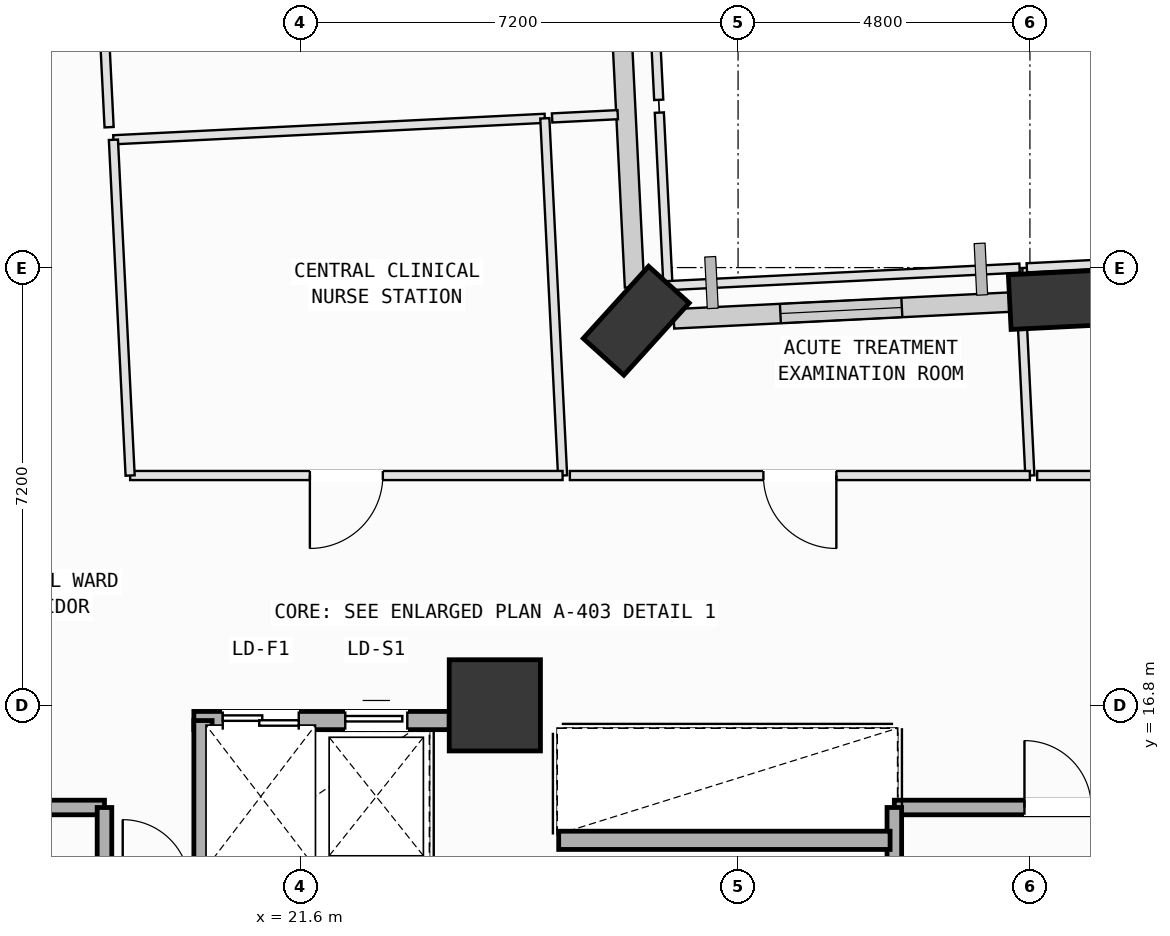
"""IFC4 building model, lengths in metres.
Left out: names, types, materials, properties, quantities, classifications, styles, units other than length and angle.
Written with IfcOpenShell. Run it as: python <this file> out.ifc"""

import sys

from ifc_helpers import new_model, si_unit, direction, frame, frame_2d, origin, origin_2d, place, context, subcontext, project, spatial, rectangle, extrude, element, fill, save


model = new_model("IFC4")
c1 = context("Model", 3, precision=1e-05, world=origin(), true_north=direction((0.0, 1.0)))
c2 = subcontext(c1, "Body", "Model", "MODEL_VIEW")
j1 = project(units=[si_unit("LENGTHUNIT", "METRE"), si_unit("PLANEANGLEUNIT", "RADIAN")], contexts=[c1])
p1 = place(None, origin())
s1 = spatial("IfcSite", under=j1, at=p1, CompositionType="ELEMENT")
p2 = place(p1, origin())
s2 = spatial("IfcBuilding", under=s1, at=p2, CompositionType="ELEMENT")
p3 = place(p2, frame((0.0, 0.0, 35.0)))
s3 = spatial("IfcBuildingStorey", under=s2, at=p3, CompositionType="ELEMENT", Elevation=35.0)
p4 = place(p3, frame((24.8, 16.8, 0.0), z_axis=(0.0, 0.0, 1.0), x_axis=(1.0, 0.0, 0.0)))
e1 = element("IfcColumn", 1, at=p4, inside=s3, PredefinedType="COLUMN", context=c2, shape_type="SweptSolid", body=[
    extrude(rectangle(XDim=1.5, YDim=1.5, at=origin_2d()), origin(), (0.0, 0.0, 1.0), 4.0),
])
p5 = place(p3, frame((34.067, 23.472, 0.002), z_axis=(0.00549776835, 0.00195476208, 0.999982976579), x_axis=(-0.381442714794, 0.924392433526, 0.000290121348)))
e2 = element("IfcColumn", 2, at=p5, inside=s3, PredefinedType="COLUMN", context=c2, shape_type="SweptSolid", body=[
    extrude(rectangle(XDim=1.6, YDim=0.9, at=origin_2d()), origin(), (0.0, 0.0, 1.0), 3.997),
])
p6 = place(p3, frame((27.125, 23.126, 0.002), z_axis=(0.007144481212, -0.02674600659, 0.999616730312), x_axis=(0.457080602538, 0.889188431992, 0.020524502304)))
e3 = element("IfcColumn", 3, at=p6, inside=s3, PredefinedType="COLUMN", context=c2, shape_type="SweptSolid", body=[
    extrude(rectangle(XDim=1.6, YDim=0.9, at=origin_2d()), origin(), (0.0, 0.0, 1.0), 3.998),
])
p7 = place(p3, frame((27.742, 23.157, 0.0), z_axis=(0.0, 0.0, 1.0), x_axis=(0.998763564374, 0.049712598789, 0.0)))
e4 = element("IfcWall", 4, at=p7, inside=s3, PredefinedType="SOLIDWALL", context=c2, shape_type="SweptSolid", body=[
    extrude(rectangle(XDim=5.736, YDim=0.32, at=frame_2d((2.868, 0.0))), origin(), (0.0, 0.0, 1.0), 3.165),
])
p8 = place(p7, frame((1.757, 0.0, 0.75)))
e5 = element("IfcOpeningElement", 5, at=p8, cuts=e4, PredefinedType="OPENING", context=c2, shape_type="SweptSolid", body=[
    extrude(rectangle(XDim=2.0, YDim=1.95, at=frame_2d((1.0, 0.975))), frame((0.0, 0.17, 0.0), z_axis=(0.0, -1.0, 0.0), x_axis=(1.0, 0.0, 0.0)), (0.0, 0.0, 1.0), 0.34),
])
p9 = place(p3, frame((27.098, 23.679, 0.0), z_axis=(0.0, 0.0, 1.0), x_axis=(-0.049717778481, 0.998763306546, 0.0)))
e6 = element("IfcWall", 6, at=p9, inside=s3, PredefinedType="SOLIDWALL", context=c2, shape_type="SweptSolid", body=[
    extrude(rectangle(XDim=6.536, YDim=0.32, at=frame_2d((3.268, 0.0))), origin(), (0.0, 0.0, 1.0), 3.165),
])
p10 = place(p3, frame((14.92, 15.12, 0.0), z_axis=(0.0, 0.0, 1.0), x_axis=(1.0, 0.0, 0.0)))
e7 = element("IfcWall", 7, at=p10, inside=s3, PredefinedType="SOLIDWALL", context=c2, shape_type="SweptSolid", body=[
    extrude(rectangle(XDim=3.46, YDim=0.24, at=frame_2d((1.73, 0.0))), origin(), (0.0, 0.0, 1.0), 3.78),
])
p11 = place(p10, frame((0.22, 0.0, 0.0)))
e8 = element("IfcOpeningElement", 8, at=p11, cuts=e7, PredefinedType="OPENING", context=c2, shape_type="SweptSolid", body=[
    extrude(rectangle(XDim=1.1, YDim=2.15, at=frame_2d((0.55, 1.075))), frame((0.0, 0.13, 0.0), z_axis=(0.0, -1.0, 0.0), x_axis=(1.0, 0.0, 0.0)), (0.0, 0.0, 1.0), 0.26),
])
p12 = place(p3, frame((18.38, 15.12, 0.0), z_axis=(0.0, 0.0, 1.0), x_axis=(0.0, -1.0, 0.0)))
e9 = element("IfcWall", 9, at=p12, inside=s3, PredefinedType="SOLIDWALL", context=c2, shape_type="SweptSolid", body=[
    extrude(rectangle(XDim=6.92, YDim=0.24, at=frame_2d((3.46, 0.0))), origin(), (0.0, 0.0, 1.0), 3.78),
])
p13 = place(p3, frame((31.37, 15.12, 0.0), z_axis=(0.0, 0.0, 1.0), x_axis=(1.0, 0.0, 0.0)))
e10 = element("IfcWall", 10, at=p13, inside=s3, PredefinedType="SOLIDWALL", context=c2, shape_type="SweptSolid", body=[
    extrude(rectangle(XDim=3.46, YDim=0.24, at=frame_2d((1.73, 0.0))), origin(), (0.0, 0.0, 1.0), 3.78),
])
p14 = place(p13, frame((2.14, 0.0, 0.0)))
e11 = element("IfcOpeningElement", 11, at=p14, cuts=e10, PredefinedType="OPENING", context=c2, shape_type="SweptSolid", body=[
    extrude(rectangle(XDim=1.1, YDim=2.15, at=frame_2d((0.55, 1.075))), frame((0.0, 0.13, 0.0), z_axis=(0.0, -1.0, 0.0), x_axis=(1.0, 0.0, 0.0)), (0.0, 0.0, 1.0), 0.26),
])
p15 = place(p3, frame((31.37, 8.2, 0.0), z_axis=(0.0, 0.0, 1.0), x_axis=(0.0, 1.0, 0.0)))
e12 = element("IfcWall", 12, at=p15, inside=s3, PredefinedType="SOLIDWALL", context=c2, shape_type="SweptSolid", body=[
    extrude(rectangle(XDim=6.92, YDim=0.24, at=frame_2d((3.46, 0.0))), origin(), (0.0, 0.0, 1.0), 3.78),
])
p16 = place(p3, frame((19.85, 16.55, 0.0), z_axis=(0.0, 0.0, 1.0), x_axis=(1.0, 0.0, 0.0)))
e13 = element("IfcWall", 13, at=p16, inside=s3, PredefinedType="SOLIDWALL", context=c2, shape_type="SweptSolid", body=[
    extrude(rectangle(XDim=4.2, YDim=0.3, at=frame_2d((2.1, 0.0))), origin(), (0.0, 0.0, 1.0), 3.78),
])
p17 = place(p16, frame((0.475, 0.0, 0.0)))
e14 = element("IfcOpeningElement", 14, at=p17, cuts=e13, PredefinedType="OPENING", context=c2, shape_type="SweptSolid", body=[
    extrude(rectangle(XDim=1.25, YDim=2.18, at=frame_2d((0.625, 1.09))), frame((0.0, 0.16, 0.0), z_axis=(0.0, -1.0, 0.0), x_axis=(1.0, 0.0, 0.0)), (0.0, 0.0, 1.0), 0.32),
])
p18 = place(p16, frame((2.49, 0.0, 0.0)))
e15 = element("IfcOpeningElement", 15, at=p18, cuts=e13, PredefinedType="OPENING", context=c2, shape_type="SweptSolid", body=[
    extrude(rectangle(XDim=1.02, YDim=2.12, at=frame_2d((0.51, 1.06))), frame((0.0, 0.16, 0.0), z_axis=(0.0, -1.0, 0.0), x_axis=(1.0, 0.0, 0.0)), (0.0, 0.0, 1.0), 0.32),
])
p19 = place(p3, frame((20.0, 13.82, 0.0), z_axis=(0.0, 0.0, 1.0), x_axis=(0.0, 1.0, 0.0)))
e16 = element("IfcWall", 16, at=p19, inside=s3, PredefinedType="SOLIDWALL", context=c2, shape_type="SweptSolid", body=[
    extrude(rectangle(XDim=2.73, YDim=0.3, at=frame_2d((1.365, 0.0))), origin(), (0.0, 0.0, 1.0), 3.78),
])
p20 = place(p3, frame((25.85, 14.58, 0.0), z_axis=(0.0, 0.0, 1.0), x_axis=(1.0, 0.0, 0.0)))
e17 = element("IfcWall", 17, at=p20, inside=s3, PredefinedType="SOLIDWALL", context=c2, shape_type="SweptSolid", body=[
    extrude(rectangle(XDim=5.45, YDim=0.3, at=frame_2d((2.725, 0.0))), origin(), (0.0, 0.0, 1.0), 3.78),
])
p21 = place(p3, frame((18.527, 26.102, 0.0), z_axis=(0.0, 0.0, 1.0), x_axis=(0.998764394094, 0.049695926288, 0.0)))
e18 = element("IfcWall", 18, at=p21, inside=s3, PredefinedType="PARTITIONING", context=c2, shape_type="SweptSolid", body=[
    extrude(rectangle(XDim=7.104, YDim=0.15, at=frame_2d((3.552, 0.0))), origin(), (0.0, 0.0, 1.0), 3.78),
])
p22 = place(p3, frame((25.622, 26.455, 0.0), z_axis=(0.0, 0.0, 1.0), x_axis=(0.049639526669, -0.998767198797, 0.0)))
e19 = element("IfcWall", 19, at=p22, inside=s3, PredefinedType="PARTITIONING", context=c2, shape_type="SweptSolid", body=[
    extrude(rectangle(XDim=5.882, YDim=0.15, at=frame_2d((2.941, 0.0))), origin(), (0.0, 0.0, 1.0), 3.78),
])
p23 = place(p3, frame((25.914, 20.58, 0.0), z_axis=(0.0, 0.0, 1.0), x_axis=(-1.0, 0.0, 0.0)))
e20 = element("IfcWall", 20, at=p23, inside=s3, PredefinedType="PARTITIONING", context=c2, shape_type="SweptSolid", body=[
    extrude(rectangle(XDim=7.112, YDim=0.15, at=frame_2d((3.556, 0.0))), origin(), (0.0, 0.0, 1.0), 3.78),
])
p24 = place(p23, frame((2.956, 0.0, 0.0)))
e21 = element("IfcOpeningElement", 21, at=p24, cuts=e20, PredefinedType="OPENING", context=c2, shape_type="SweptSolid", body=[
    extrude(rectangle(XDim=1.2, YDim=2.15, at=frame_2d((0.6, 1.075))), frame((0.0, 0.085, 0.0), z_axis=(0.0, -1.0, 0.0), x_axis=(1.0, 0.0, 0.0)), (0.0, 0.0, 1.0), 0.17),
])
p25 = place(p3, frame((18.802, 20.58, 0.0), z_axis=(0.0, 0.0, 1.0), x_axis=(-0.049721781713, 0.99876310726, 0.0)))
e22 = element("IfcWall", 22, at=p25, inside=s3, PredefinedType="PARTITIONING", context=c2, shape_type="SweptSolid", body=[
    extrude(rectangle(XDim=5.529, YDim=0.15, at=frame_2d((2.764, 0.0))), origin(), (0.0, 0.0, 1.0), 3.78),
])
p26 = place(p3, frame((25.742, 26.461, 0.0), z_axis=(0.0, 0.0, 1.0), x_axis=(0.998752338878, 0.049937616944, 0.0)))
e23 = element("IfcWall", 23, at=p26, inside=s3, PredefinedType="PARTITIONING", context=c2, shape_type="SweptSolid", body=[
    extrude(rectangle(XDim=1.081, YDim=0.15, at=frame_2d((0.54, 0.0))), origin(), (0.0, 0.0, 1.0), 3.78),
])
p27 = place(p3, frame((27.505, 26.549, 0.0), z_axis=(0.0, 0.0, 1.0), x_axis=(0.049860704893, -0.998756181512, 0.0)))
e24 = element("IfcWall", 24, at=p27, inside=s3, PredefinedType="PARTITIONING", context=c2, shape_type="SweptSolid", body=[
    extrude(rectangle(XDim=2.85, YDim=0.15, at=frame_2d((1.425, 0.0))), origin(), (0.0, 0.0, 1.0), 3.78),
])
p28 = place(p3, frame((27.647, 23.703, 0.0), z_axis=(0.0, 0.0, 1.0), x_axis=(0.998761470129, 0.049754655919, 0.0)))
e25 = element("IfcWall", 25, at=p28, inside=s3, PredefinedType="PARTITIONING", context=c2, shape_type="SweptSolid", body=[
    extrude(rectangle(XDim=5.79, YDim=0.15, at=frame_2d((2.895, 0.0))), origin(), (0.0, 0.0, 1.0), 3.78),
])
p29 = place(p3, frame((33.464, 23.306, 0.0), z_axis=(0.0, 0.0, 1.0), x_axis=(0.049469138908, -0.998775652635, 0.0)))
e26 = element("IfcWall", 26, at=p29, inside=s3, PredefinedType="PARTITIONING", context=c2, shape_type="SweptSolid", body=[
    extrude(rectangle(XDim=2.729, YDim=0.15, at=frame_2d((1.365, 0.0))), origin(), (0.0, 0.0, 1.0), 3.78),
])
p30 = place(p3, frame((33.599, 20.58, 0.0), z_axis=(0.0, 0.0, 1.0), x_axis=(-1.0, 0.0, 0.0)))
e27 = element("IfcWall", 27, at=p30, inside=s3, PredefinedType="PARTITIONING", context=c2, shape_type="SweptSolid", body=[
    extrude(rectangle(XDim=7.565, YDim=0.15, at=frame_2d((3.783, 0.0))), origin(), (0.0, 0.0, 1.0), 3.78),
])
p31 = place(p30, frame((3.183, 0.0, 0.0)))
e28 = element("IfcOpeningElement", 28, at=p31, cuts=e27, PredefinedType="OPENING", context=c2, shape_type="SweptSolid", body=[
    extrude(rectangle(XDim=1.2, YDim=2.15, at=frame_2d((0.6, 1.075))), frame((0.0, 0.085, 0.0), z_axis=(0.0, -1.0, 0.0), x_axis=(1.0, 0.0, 0.0)), (0.0, 0.0, 1.0), 0.17),
])
p32 = place(p3, frame((38.0, 20.58, 0.0), z_axis=(0.0, 0.0, 1.0), x_axis=(-1.0, 0.0, 0.0)))
e29 = element("IfcWall", 29, at=p32, inside=s3, PredefinedType="PARTITIONING", context=c2, shape_type="SweptSolid", body=[
    extrude(rectangle(XDim=4.281, YDim=0.15, at=frame_2d((2.141, 0.0))), origin(), (0.0, 0.0, 1.0), 3.365),
])
p33 = place(p32, frame((1.541, 0.0, 0.0)))
e30 = element("IfcOpeningElement", 30, at=p33, cuts=e29, PredefinedType="OPENING", context=c2, shape_type="SweptSolid", body=[
    extrude(rectangle(XDim=1.2, YDim=2.15, at=frame_2d((0.6, 1.075))), frame((0.0, 0.085, 0.0), z_axis=(0.0, -1.0, 0.0), x_axis=(1.0, 0.0, 0.0)), (0.0, 0.0, 1.0), 0.17),
])
p34 = place(p3, frame((33.572, 23.531, 0.0), z_axis=(0.0, 0.0, 1.0), x_axis=(-0.049283869976, 0.998784811739, 0.0)))
e31 = element("IfcWall", 31, at=p34, inside=s3, PredefinedType="PARTITIONING", context=c2, shape_type="SweptSolid", body=[
    extrude(rectangle(XDim=0.466, YDim=0.15, at=frame_2d((0.233, 0.0))), origin(), (0.0, 0.0, 1.0), 3.78),
])
p35 = place(p3, frame((33.549, 23.996, 0.0), z_axis=(0.0, 0.0, 1.0), x_axis=(0.998761346761, 0.049757132311, 0.0)))
e32 = element("IfcWall", 32, at=p35, inside=s3, PredefinedType="PARTITIONING", context=c2, shape_type="SweptSolid", body=[
    extrude(rectangle(XDim=7.556, YDim=0.15, at=frame_2d((3.778, 0.0))), origin(), (0.0, 0.0, 1.0), 3.78),
])
p36 = place(p3, frame((18.456, 26.309, 0.0), z_axis=(0.0, 0.0, 1.0), x_axis=(-0.049754032713, 0.998761501175, 0.0)))
e33 = element("IfcWall", 33, at=p36, inside=s3, PredefinedType="PARTITIONING", context=c2, shape_type="SweptSolid", body=[
    extrude(rectangle(XDim=9.75, YDim=0.15, at=frame_2d((4.875, 0.0))), origin(), (0.0, 0.0, 1.0), 3.78),
])
p37 = place(p36, frame((4.275, 0.0, 0.0)))
e34 = element("IfcOpeningElement", 34, at=p37, cuts=e33, PredefinedType="OPENING", context=c2, shape_type="SweptSolid", body=[
    extrude(rectangle(XDim=1.2, YDim=2.15, at=frame_2d((0.6, 1.075))), frame((0.0, 0.085, 0.0), z_axis=(0.0, -1.0, 0.0), x_axis=(1.0, 0.0, 0.0)), (0.0, 0.0, 1.0), 0.17),
])
p38 = place(p3, frame((27.01, 36.497, 0.0), z_axis=(0.0, 0.0, 1.0), x_axis=(0.049754032713, -0.998761501175, 0.0)))
e35 = element("IfcWall", 35, at=p38, inside=s3, PredefinedType="PARTITIONING", context=c2, shape_type="SweptSolid", body=[
    extrude(rectangle(XDim=9.75, YDim=0.15, at=frame_2d((4.875, 0.0))), origin(), (0.0, 0.0, 1.0), 3.78),
])
p39 = place(p8, origin())
e36 = element("IfcWindow", 36, at=p39, inside=s3, PartitioningType="SINGLE_PANEL", PredefinedType="WINDOW", context=c2, shape_type="SweptSolid", body=[
    extrude(rectangle(XDim=2.0, YDim=1.95, at=frame_2d((1.0, 0.975))), frame((0.0, 0.03, 0.0), z_axis=(0.0, -1.0, 0.0), x_axis=(1.0, 0.0, 0.0)), (0.0, 0.0, 1.0), 0.06),
])
fill(e5, e36)
p40 = place(p14, origin())
e37 = element("IfcDoor", 37, at=p40, inside=s3, OperationType="SINGLE_SWING_LEFT", PredefinedType="DOOR", context=c2, shape_type="SweptSolid", body=[
    extrude(rectangle(XDim=1.1, YDim=2.15, at=frame_2d((0.55, 1.075))), frame((0.0, 0.025, 0.0), z_axis=(0.0, -1.0, 0.0), x_axis=(1.0, 0.0, 0.0)), (0.0, 0.0, 1.0), 0.05),
])
fill(e11, e37)
p41 = place(p17, origin())
e38 = element("IfcDoor", 38, at=p41, inside=s3, OperationType="DOUBLE_DOOR_SLIDING", PredefinedType="DOOR", context=c2, shape_type="SweptSolid", body=[
    extrude(rectangle(XDim=1.25, YDim=2.18, at=frame_2d((0.625, 1.09))), frame((0.0, 0.025, 0.0), z_axis=(0.0, -1.0, 0.0), x_axis=(1.0, 0.0, 0.0)), (0.0, 0.0, 1.0), 0.05),
])
fill(e14, e38)
p42 = place(p18, origin())
e39 = element("IfcDoor", 39, at=p42, inside=s3, OperationType="SLIDING_TO_LEFT", PredefinedType="DOOR", context=c2, shape_type="SweptSolid", body=[
    extrude(rectangle(XDim=1.02, YDim=2.12, at=frame_2d((0.51, 1.06))), frame((0.0, 0.025, 0.0), z_axis=(0.0, -1.0, 0.0), x_axis=(1.0, 0.0, 0.0)), (0.0, 0.0, 1.0), 0.05),
])
fill(e15, e39)
p43 = place(p24, origin())
e40 = element("IfcDoor", 40, at=p43, inside=s3, OperationType="SINGLE_SWING_RIGHT", PredefinedType="DOOR", context=c2, shape_type="SweptSolid", body=[
    extrude(rectangle(XDim=1.2, YDim=2.15, at=frame_2d((0.6, 1.075))), frame((0.0, 0.025, 0.0), z_axis=(0.0, -1.0, 0.0), x_axis=(1.0, 0.0, 0.0)), (0.0, 0.0, 1.0), 0.05),
])
fill(e21, e40)
p44 = place(p31, origin())
e41 = element("IfcDoor", 41, at=p44, inside=s3, OperationType="SINGLE_SWING_LEFT", PredefinedType="DOOR", context=c2, shape_type="SweptSolid", body=[
    extrude(rectangle(XDim=1.2, YDim=2.15, at=frame_2d((0.6, 1.075))), frame((0.0, 0.025, 0.0), z_axis=(0.0, -1.0, 0.0), x_axis=(1.0, 0.0, 0.0)), (0.0, 0.0, 1.0), 0.05),
])
fill(e28, e41)
save(model, sys.argv[1])
